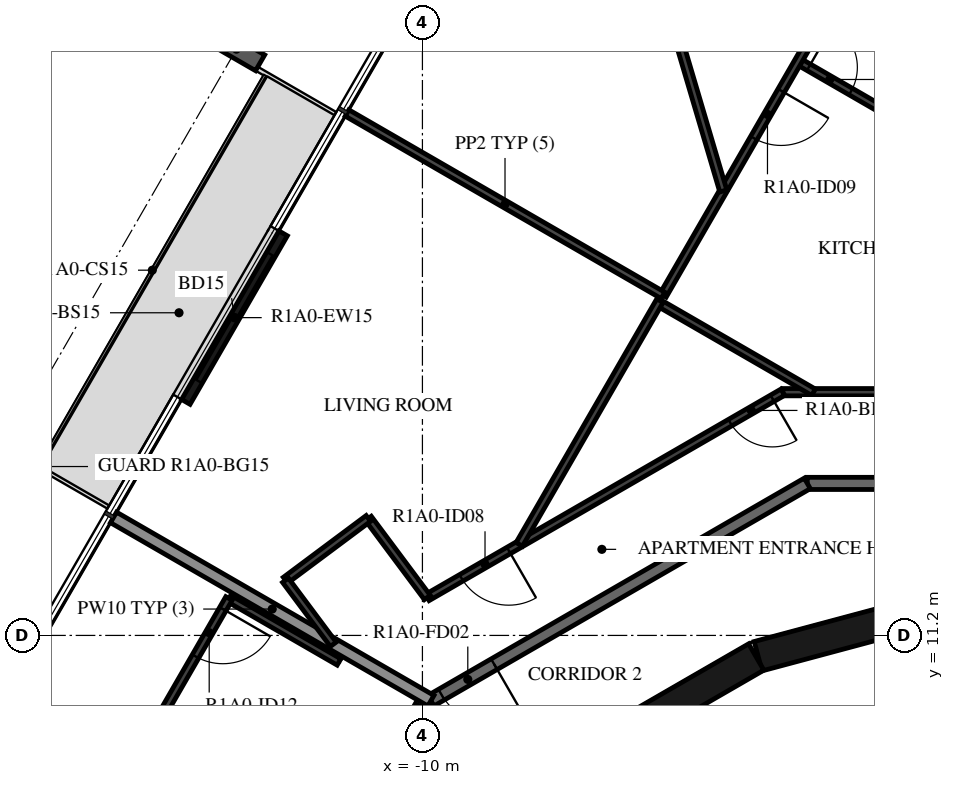
"""IFC4 building model, lengths in metres.
Left out: names, types, materials, properties, quantities, classifications, styles, units other than length and angle.
Written with IfcOpenShell. Run it as: python <this file> out.ifc"""

import sys

from ifc_helpers import new_model, si_unit, direction, frame, frame_2d, origin, origin_2d, place, context, subcontext, project, spatial, rectangle, i_section, extrude, element, fill, save


model = new_model("IFC4")
c1 = context("Model", 3, precision=1e-05, world=origin(), true_north=direction((0.0, 1.0)))
c2 = subcontext(c1, "Body", "Model", "MODEL_VIEW")
j1 = project(units=[si_unit("LENGTHUNIT", "METRE"), si_unit("PLANEANGLEUNIT", "RADIAN")], contexts=[c1])
p1 = place(None, origin())
s1 = spatial("IfcSite", under=j1, at=p1, CompositionType="ELEMENT")
p2 = place(p1, origin())
s2 = spatial("IfcBuilding", under=s1, at=p2, CompositionType="ELEMENT")
p3 = place(p2, frame((0.0, 0.0, 45.4)))
s3 = spatial("IfcBuildingStorey", under=s2, at=p3, CompositionType="ELEMENT", Elevation=45.4)
p4 = place(p3, frame((-13.059, 20.842, -0.38), z_axis=(0.0, 0.0, 1.0), x_axis=(0.50000017485, 0.866025302835, 0.0)))
e1 = element("IfcColumn", 1, at=p4, inside=s3, PredefinedType="COLUMN", context=c2, shape_type="SweptSolid", body=[
    extrude(i_section(OverallWidth=0.3, OverallDepth=0.9, WebThickness=0.019, FlangeThickness=0.035, FilletRadius=0.03, at=origin_2d()), origin(), (0.0, 0.0, 1.0), 3.5),
])
p5 = place(p3, frame((-12.291, 17.812, 0.0), z_axis=(0.0, 0.0, 1.0), x_axis=(-0.499971222258, -0.866042017984, 0.0)))
e2 = element("IfcWall", 2, at=p5, inside=s3, PredefinedType="STANDARD", context=c2, shape_type="SweptSolid", body=[
    extrude(rectangle(XDim=3.2, YDim=0.16, at=frame_2d((1.6, 0.0))), origin(), (0.0, 0.0, 1.0), 3.12),
])
p6 = place(p5, frame((0.4, 0.0, 0.0)))
e3 = element("IfcOpeningElement", 3, at=p6, cuts=e2, PredefinedType="OPENING", context=c2, shape_type="SweptSolid", body=[
    extrude(rectangle(XDim=2.4, YDim=2.4, at=frame_2d((1.2, 1.2))), frame((0.0, 0.09, 0.0), z_axis=(0.0, -1.0, 0.0), x_axis=(1.0, 0.0, 0.0)), (0.0, 0.0, 1.0), 0.18),
])
for number, where, z_axis, x_axis in (
    (4, (-1.55, 11.643, 0.0), (0.0, 0.0, 1.0), (-0.966, -0.259, 0.0)),
    (5, (-4.51, 10.845, 0.0), (0.0, 0.0, 1.0), (-0.866, -0.5, 0.0)),
):
    element("IfcWall", number, at=place(p3, frame(where, z_axis=z_axis, x_axis=x_axis)), inside=s3, PredefinedType="SHEAR", context=c2, shape_type="SweptSolid", body=[
        extrude(rectangle(XDim=3.033, YDim=0.5, at=frame_2d((1.516, 0.0))), origin(), (0.0, 0.0, 1.0), 3.12),
    ])
p7 = place(p3, frame((3.671, 13.7, 0.0), z_axis=(0.0, 0.0, 1.0), x_axis=(-1.0, 0.0, 0.0)))
e6 = element("IfcWall", 6, at=p7, inside=s3, PredefinedType="STANDARD", context=c2, shape_type="SweptSolid", body=[
    extrude(rectangle(XDim=7.342, YDim=0.2, at=frame_2d((3.671, 0.0))), origin(), (0.0, 0.0, 1.0), 3.12),
])
p8 = place(p3, frame((-3.671, 13.7, 0.0), z_axis=(0.0, 0.0, 1.0), x_axis=(-0.866031419417, -0.499989580474, 0.0)))
e7 = element("IfcWall", 7, at=p8, inside=s3, PredefinedType="STANDARD", context=c2, shape_type="SweptSolid", body=[
    extrude(rectangle(XDim=7.147, YDim=0.2, at=frame_2d((3.573, 0.0))), origin(), (0.0, 0.0, 1.0), 3.12),
])
p9 = place(p8, frame((5.947, 0.0, 0.0)))
e8 = element("IfcOpeningElement", 8, at=p9, cuts=e7, PredefinedType="OPENING", context=c2, shape_type="SweptSolid", body=[
    extrude(rectangle(XDim=1.0, YDim=2.1, at=frame_2d((0.5, 1.05))), frame((0.0, 0.11, 0.0), z_axis=(0.0, -1.0, 0.0), x_axis=(1.0, 0.0, 0.0)), (0.0, 0.0, 1.0), 0.22),
])
p10 = place(p3, frame((-10.029, 10.029, 0.0), z_axis=(0.0, 0.0, 1.0), x_axis=(-0.500001669485, -0.866024439905, 0.0)))
e9 = element("IfcWall", 9, at=p10, inside=s3, PredefinedType="STANDARD", context=c2, shape_type="SweptSolid", body=[
    extrude(rectangle(XDim=7.342, YDim=0.2, at=frame_2d((3.671, 0.0))), origin(), (0.0, 0.0, 1.0), 3.12),
])
p11 = place(p10, frame((0.2, 0.0, 0.0)))
e10 = element("IfcOpeningElement", 10, at=p11, cuts=e9, PredefinedType="OPENING", context=c2, shape_type="SweptSolid", body=[
    extrude(rectangle(XDim=1.0, YDim=2.1, at=frame_2d((0.5, 1.05))), frame((0.0, 0.11, 0.0), z_axis=(0.0, -1.0, 0.0), x_axis=(1.0, 0.0, 0.0)), (0.0, 0.0, 1.0), 0.22),
])
p12 = place(p3, frame((-15.08, 13.14, 0.0), z_axis=(0.0, 0.0, 1.0), x_axis=(0.86603112331, -0.49999009336, 0.0)))
e11 = element("IfcWall", 11, at=p12, inside=s3, PredefinedType="STANDARD", context=c2, shape_type="SweptSolid", body=[
    extrude(rectangle(XDim=6.027, YDim=0.2, at=frame_2d((3.014, 0.0))), origin(), (0.0, 0.0, 1.0), 2.73),
])
p13 = place(p3, frame((0.0, 15.2, 0.0), z_axis=(0.0, 0.0, 1.0), x_axis=(-1.0, 0.0, 0.0)))
e12 = element("IfcWall", 12, at=p13, inside=s3, PredefinedType="PARTITIONING", context=c2, shape_type="SweptSolid", body=[
    extrude(rectangle(XDim=4.073, YDim=0.12, at=frame_2d((2.036, 0.0))), origin(), (0.0, 0.0, 1.0), 3.12),
])
p14 = place(p13, frame((0.2, 0.0, 0.0)))
e13 = element("IfcOpeningElement", 13, at=p14, cuts=e12, PredefinedType="OPENING", context=c2, shape_type="SweptSolid", body=[
    extrude(rectangle(XDim=0.9, YDim=2.1, at=frame_2d((0.45, 1.05))), frame((0.0, 0.07, 0.0), z_axis=(0.0, -1.0, 0.0), x_axis=(1.0, 0.0, 0.0)), (0.0, 0.0, 1.0), 0.14),
])
p15 = place(p3, frame((-4.073, 15.2, 0.0), z_axis=(0.0, 0.0, 1.0), x_axis=(-0.866024802457, -0.500001041529, 0.0)))
e14 = element("IfcWall", 14, at=p15, inside=s3, PredefinedType="PARTITIONING", context=c2, shape_type="SweptSolid", body=[
    extrude(rectangle(XDim=6.751, YDim=0.12, at=frame_2d((3.376, 0.0))), origin(), (0.0, 0.0, 1.0), 3.12),
])
p16 = place(p15, frame((0.2, 0.0, 0.0)))
e15 = element("IfcOpeningElement", 15, at=p16, cuts=e14, PredefinedType="OPENING", context=c2, shape_type="SweptSolid", body=[
    extrude(rectangle(XDim=0.8, YDim=2.1, at=frame_2d((0.4, 1.05))), frame((0.0, 0.07, 0.0), z_axis=(0.0, -1.0, 0.0), x_axis=(1.0, 0.0, 0.0)), (0.0, 0.0, 1.0), 0.14),
])
p17 = place(p15, frame((5.206, 0.0, 0.0)))
e16 = element("IfcOpeningElement", 16, at=p17, cuts=e14, PredefinedType="OPENING", context=c2, shape_type="SweptSolid", body=[
    extrude(rectangle(XDim=0.9, YDim=2.1, at=frame_2d((0.45, 1.05))), frame((0.0, 0.07, 0.0), z_axis=(0.0, -1.0, 0.0), x_axis=(1.0, 0.0, 0.0)), (0.0, 0.0, 1.0), 0.14),
])
p18 = place(p3, frame((-9.92, 11.824, 0.0), z_axis=(0.0, 0.0, 1.0), x_axis=(-0.597853402964, 0.801605456921, 0.0)))
e17 = element("IfcWall", 17, at=p18, inside=s3, PredefinedType="PARTITIONING", context=c2, shape_type="SweptSolid", body=[
    extrude(rectangle(XDim=1.621, YDim=0.12, at=frame_2d((0.811, 0.0))), origin(), (0.0, 0.0, 1.0), 3.12),
])
p19 = place(p3, frame((-10.889, 13.124, 0.0), z_axis=(0.0, 0.0, 1.0), x_axis=(-0.801616976804, -0.597837956724, 0.0)))
e18 = element("IfcWall", 18, at=p19, inside=s3, PredefinedType="PARTITIONING", context=c2, shape_type="SweptSolid", body=[
    extrude(rectangle(XDim=1.7, YDim=0.12, at=frame_2d((0.85, 0.0))), origin(), (0.0, 0.0, 1.0), 3.12),
])
p20 = place(p3, frame((-12.252, 12.107, 0.0), z_axis=(0.0, 0.0, 1.0), x_axis=(0.597827926538, -0.801624457119, 0.0)))
e19 = element("IfcWall", 19, at=p20, inside=s3, PredefinedType="PARTITIONING", context=c2, shape_type="SweptSolid", body=[
    extrude(rectangle(XDim=1.314, YDim=0.12, at=frame_2d((0.657, 0.0))), origin(), (0.0, 0.0, 1.0), 3.12),
])
p21 = place(p3, frame((-3.821, 20.643, 0.0), z_axis=(0.0, 0.0, 1.0), x_axis=(0.866024310165, -0.5000018942, 0.0)))
e20 = element("IfcWall", 20, at=p21, inside=s3, PredefinedType="PARTITIONING", context=c2, shape_type="SweptSolid", body=[
    extrude(rectangle(XDim=4.412, YDim=0.12, at=frame_2d((2.206, 0.0))), origin(), (0.0, 0.0, 1.0), 3.12),
])
p22 = place(p21, frame((0.2, 0.0, 0.0)))
e21 = element("IfcOpeningElement", 21, at=p22, cuts=e20, PredefinedType="OPENING", context=c2, shape_type="SweptSolid", body=[
    extrude(rectangle(XDim=0.8, YDim=2.1, at=frame_2d((0.4, 1.05))), frame((0.0, 0.07, 0.0), z_axis=(0.0, -1.0, 0.0), x_axis=(1.0, 0.0, 0.0)), (0.0, 0.0, 1.0), 0.14),
])
p23 = place(p3, frame((-1.907, 23.957, 0.0), z_axis=(0.0, 0.0, 1.0), x_axis=(-0.499994901178, -0.866028347571, 0.0)))
e22 = element("IfcWall", 22, at=p23, inside=s3, PredefinedType="PARTITIONING", context=c2, shape_type="SweptSolid", body=[
    extrude(rectangle(XDim=8.274, YDim=0.12, at=frame_2d((4.137, 0.0))), origin(), (0.0, 0.0, 1.0), 3.12),
])
p24 = place(p23, frame((4.387, 0.0, 0.0)))
e23 = element("IfcOpeningElement", 23, at=p24, cuts=e22, PredefinedType="OPENING", context=c2, shape_type="SweptSolid", body=[
    extrude(rectangle(XDim=0.9, YDim=2.1, at=frame_2d((0.45, 1.05))), frame((0.0, 0.07, 0.0), z_axis=(0.0, -1.0, 0.0), x_axis=(1.0, 0.0, 0.0)), (0.0, 0.0, 1.0), 0.14),
])
p25 = place(p3, frame((-6.114, 16.67, 0.0), z_axis=(0.0, 0.0, 1.0), x_axis=(0.866011328839, -0.500024377727, 0.0)))
e24 = element("IfcWall", 24, at=p25, inside=s3, PredefinedType="PARTITIONING", context=c2, shape_type="SweptSolid", body=[
    extrude(rectangle(XDim=2.94, YDim=0.12, at=frame_2d((1.47, 0.0))), origin(), (0.0, 0.0, 1.0), 3.12),
])
p26 = place(p3, frame((-7.4, 26.443, 0.0), z_axis=(0.0, 0.0, 1.0), x_axis=(0.283777867447, -0.95889004685, 0.0)))
e25 = element("IfcWall", 25, at=p26, inside=s3, PredefinedType="PARTITIONING", context=c2, shape_type="SweptSolid", body=[
    extrude(rectangle(XDim=8.274, YDim=0.12, at=frame_2d((4.137, 0.0))), origin(), (0.0, 0.0, 1.0), 3.12),
])
p27 = place(p26, frame((0.8, 0.0, 0.0)))
e26 = element("IfcOpeningElement", 26, at=p27, cuts=e25, PredefinedType="OPENING", context=c2, shape_type="SweptSolid", body=[
    extrude(rectangle(XDim=0.9, YDim=2.1, at=frame_2d((0.45, 1.05))), frame((0.0, 0.07, 0.0), z_axis=(0.0, -1.0, 0.0), x_axis=(1.0, 0.0, 0.0)), (0.0, 0.0, 1.0), 0.14),
])
p28 = place(p3, frame((-11.24, 19.792, 0.0), z_axis=(0.0, 0.0, 1.0), x_axis=(0.866031096941, -0.499990139034, 0.0)))
e27 = element("IfcWall", 27, at=p28, inside=s3, PredefinedType="PARTITIONING", context=c2, shape_type="SweptSolid", body=[
    extrude(rectangle(XDim=6.0, YDim=0.12, at=frame_2d((3.0, 0.0))), origin(), (0.0, 0.0, 1.0), 2.73),
])
p29 = place(p3, frame((-6.094, 16.705, 0.0), z_axis=(0.0, 0.0, 1.0), x_axis=(-0.500014747178, -0.86601688933, 0.0)))
e28 = element("IfcWall", 28, at=p29, inside=s3, PredefinedType="PARTITIONING", context=c2, shape_type="SweptSolid", body=[
    extrude(rectangle(XDim=4.627, YDim=0.12, at=frame_2d((2.313, 0.0))), origin(), (0.0, 0.0, 1.0), 3.12),
])
p30 = place(p3, frame((-11.372, 10.763, 0.0), z_axis=(0.0, 0.0, 1.0), x_axis=(-0.866041603473, 0.499971940267, 0.0)))
e29 = element("IfcWall", 29, at=p30, inside=s3, PredefinedType="PARTITIONING", context=c2, shape_type="SweptSolid", body=[
    extrude(rectangle(XDim=2.089, YDim=0.12, at=frame_2d((1.045, 0.0))), origin(), (0.0, 0.0, 1.0), 3.12),
])
p31 = place(p3, frame((-13.181, 11.808, 0.0), z_axis=(0.0, 0.0, 1.0), x_axis=(-0.50002983664, -0.866008176907, 0.0)))
e30 = element("IfcWall", 30, at=p31, inside=s3, PredefinedType="PARTITIONING", context=c2, shape_type="SweptSolid", body=[
    extrude(rectangle(XDim=4.4, YDim=0.12, at=frame_2d((2.2, 0.0))), origin(), (0.0, 0.0, 1.0), 3.12),
])
p32 = place(p31, frame((0.2, 0.0, 0.0)))
e31 = element("IfcOpeningElement", 31, at=p32, cuts=e30, PredefinedType="OPENING", context=c2, shape_type="SweptSolid", body=[
    extrude(rectangle(XDim=0.9, YDim=2.1, at=frame_2d((0.45, 1.05))), frame((0.0, 0.07, 0.0), z_axis=(0.0, -1.0, 0.0), x_axis=(1.0, 0.0, 0.0)), (0.0, 0.0, 1.0), 0.14),
])
p33 = place(p6, origin())
e32 = element("IfcDoor", 32, at=p33, inside=s3, OperationType="DOUBLE_DOOR_SLIDING", PredefinedType="DOOR", context=c2, shape_type="SweptSolid", body=[
    extrude(rectangle(XDim=2.4, YDim=2.4, at=frame_2d((1.2, 1.2))), frame((0.0, 0.025, 0.0), z_axis=(0.0, -1.0, 0.0), x_axis=(1.0, 0.0, 0.0)), (0.0, 0.0, 1.0), 0.05),
])
fill(e3, e32)
p34 = place(p9, origin())
e33 = element("IfcDoor", 33, at=p34, inside=s3, OperationType="SINGLE_SWING_LEFT", PredefinedType="DOOR", context=c2, shape_type="SweptSolid", body=[
    extrude(rectangle(XDim=1.0, YDim=2.1, at=frame_2d((0.5, 1.05))), frame((0.0, 0.025, 0.0), z_axis=(0.0, -1.0, 0.0), x_axis=(1.0, 0.0, 0.0)), (0.0, 0.0, 1.0), 0.05),
])
fill(e8, e33)
p35 = place(p16, origin())
e34 = element("IfcDoor", 34, at=p35, inside=s3, OperationType="SINGLE_SWING_LEFT", PredefinedType="DOOR", context=c2, shape_type="SweptSolid", body=[
    extrude(rectangle(XDim=0.8, YDim=2.1, at=frame_2d((0.4, 1.05))), frame((0.0, 0.025, 0.0), z_axis=(0.0, -1.0, 0.0), x_axis=(1.0, 0.0, 0.0)), (0.0, 0.0, 1.0), 0.05),
])
fill(e15, e34)
p36 = place(p17, origin())
e35 = element("IfcDoor", 35, at=p36, inside=s3, OperationType="SINGLE_SWING_LEFT", PredefinedType="DOOR", context=c2, shape_type="SweptSolid", body=[
    extrude(rectangle(XDim=0.9, YDim=2.1, at=frame_2d((0.45, 1.05))), frame((0.0, 0.025, 0.0), z_axis=(0.0, -1.0, 0.0), x_axis=(1.0, 0.0, 0.0)), (0.0, 0.0, 1.0), 0.05),
])
fill(e16, e35)
p37 = place(p22, origin())
e36 = element("IfcDoor", 36, at=p37, inside=s3, OperationType="SINGLE_SWING_LEFT", PredefinedType="DOOR", context=c2, shape_type="SweptSolid", body=[
    extrude(rectangle(XDim=0.8, YDim=2.1, at=frame_2d((0.4, 1.05))), frame((0.0, 0.025, 0.0), z_axis=(0.0, -1.0, 0.0), x_axis=(1.0, 0.0, 0.0)), (0.0, 0.0, 1.0), 0.05),
])
fill(e21, e36)
p38 = place(p24, origin())
e37 = element("IfcDoor", 37, at=p38, inside=s3, OperationType="SINGLE_SWING_LEFT", PredefinedType="DOOR", context=c2, shape_type="SweptSolid", body=[
    extrude(rectangle(XDim=0.9, YDim=2.1, at=frame_2d((0.45, 1.05))), frame((0.0, 0.025, 0.0), z_axis=(0.0, -1.0, 0.0), x_axis=(1.0, 0.0, 0.0)), (0.0, 0.0, 1.0), 0.05),
])
fill(e23, e37)
p39 = place(p32, origin())
e38 = element("IfcDoor", 38, at=p39, inside=s3, OperationType="SINGLE_SWING_LEFT", PredefinedType="DOOR", context=c2, shape_type="SweptSolid", body=[
    extrude(rectangle(XDim=0.9, YDim=2.1, at=frame_2d((0.45, 1.05))), frame((0.0, 0.025, 0.0), z_axis=(0.0, -1.0, 0.0), x_axis=(1.0, 0.0, 0.0)), (0.0, 0.0, 1.0), 0.05),
])
fill(e31, e38)
save(model, sys.argv[1])
